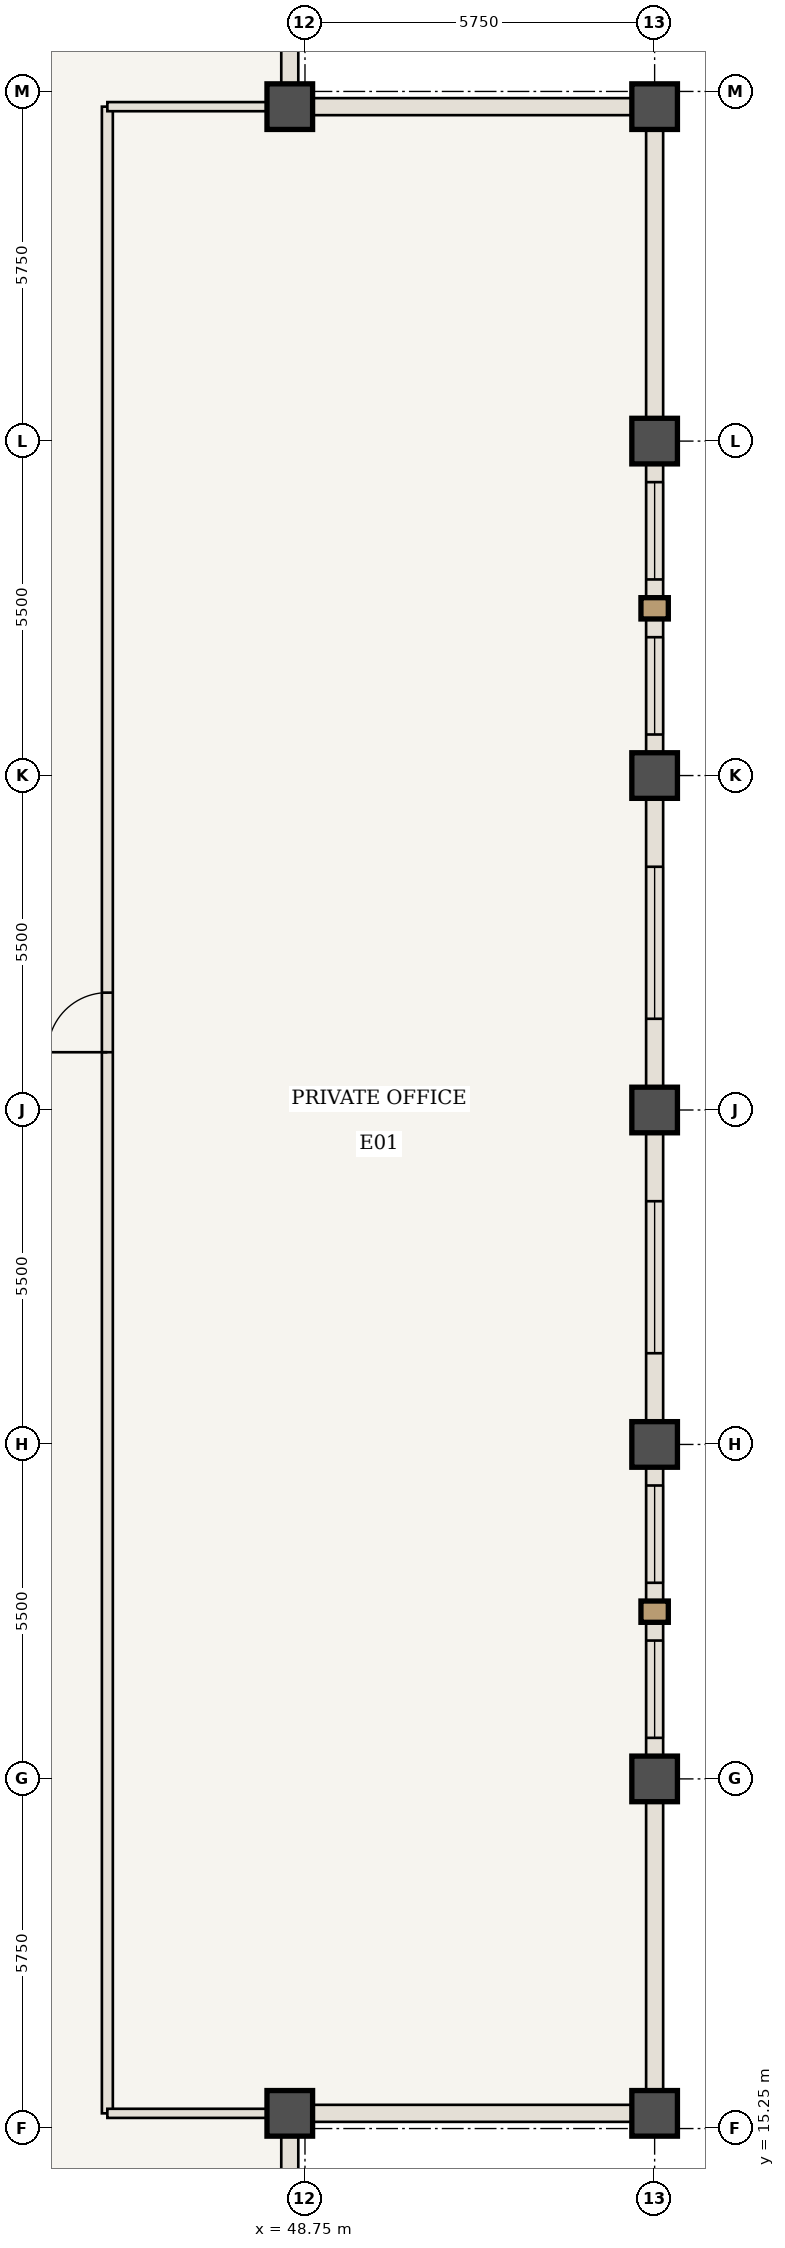
"""IFC4 building model, lengths in metres.
Left out: names, types, materials, properties, quantities, classifications, styles, units other than length and angle.
Written with IfcOpenShell. Run it as: python <this file> out.ifc"""

import sys

from ifc_helpers import new_model, si_unit, direction, frame, frame_2d, origin, origin_2d, place, context, subcontext, project, spatial, rectangle, extrude, element, fill, save


model = new_model("IFC4")
c1 = context("Model", 3, precision=1e-05, world=origin(), true_north=direction((0.0, 1.0)))
c2 = subcontext(c1, "Body", "Model", "MODEL_VIEW")
j1 = project(units=[si_unit("LENGTHUNIT", "METRE"), si_unit("PLANEANGLEUNIT", "RADIAN")], contexts=[c1])
p1 = place(None, origin())
s1 = spatial("IfcSite", under=j1, at=p1, CompositionType="ELEMENT")
p2 = place(p1, origin())
s2 = spatial("IfcBuilding", under=s1, at=p2, CompositionType="ELEMENT")
p3 = place(p2, frame((0.0, 0.0, 296.8)))
s3 = spatial("IfcBuildingStorey", under=s2, at=p3, CompositionType="ELEMENT", Elevation=296.8)
for number, where, z_axis, x_axis in (
    (1, (48.5, 15.5, 0.0), (0.0, 0.0, 1.0), (1.0, 0.0, 0.0)),
    (2, (54.5, 15.5, 0.0), (0.0, 0.0, 1.0), (1.0, 0.0, 0.0)),
    (3, (54.5, 48.5, 0.0), (0.0, 0.0, 1.0), (1.0, 0.0, 0.0)),
    (4, (48.5, 48.5, 0.0), (0.0, 0.0, 1.0), (1.0, 0.0, 0.0)),
    (5, (54.5, 21.0, 0.0), (0.0, 0.0, 1.0), (1.0, 0.0, 0.0)),
    (6, (54.5, 26.5, 0.0), (0.0, 0.0, 1.0), (1.0, 0.0, 0.0)),
    (7, (54.5, 32.0, 0.0), (0.0, 0.0, 1.0), (1.0, 0.0, 0.0)),
    (8, (54.5, 37.5, 0.0), (0.0, 0.0, 1.0), (1.0, 0.0, 0.0)),
    (9, (54.5, 43.0, 0.0), (0.0, 0.0, 1.0), (1.0, 0.0, 0.0)),
):
    element("IfcColumn", number, at=place(p3, frame(where, z_axis=z_axis, x_axis=x_axis)), inside=s3, PredefinedType="COLUMN", context=c2, shape_type="SweptSolid", body=[
        extrude(rectangle(XDim=0.75, YDim=0.75, at=origin_2d()), origin(), (0.0, 0.0, 1.0), 3.85),
    ])
p4 = place(p3, frame((45.5, 15.5, 0.0), z_axis=(0.0, 0.0, 1.0), x_axis=(0.0, 1.0, 0.0)))
e10 = element("IfcWall", 10, at=p4, inside=s3, PredefinedType="STANDARD", context=c2, shape_type="SweptSolid", body=[
    extrude(rectangle(XDim=33.0, YDim=0.18, at=frame_2d((16.5, 0.0))), origin(), (0.0, 0.0, 1.0), 3.685),
])
p5 = place(p4, frame((17.45, 0.0, 0.0)))
e11 = element("IfcOpeningElement", 11, at=p5, cuts=e10, PredefinedType="OPENING", context=c2, shape_type="SweptSolid", body=[
    extrude(rectangle(XDim=0.98, YDim=2.2, at=frame_2d((0.49, 1.1))), frame((0.0, 0.1, 0.0), z_axis=(0.0, -1.0, 0.0), x_axis=(1.0, 0.0, 0.0)), (0.0, 0.0, 1.0), 0.2),
])
for number, where, z_axis, x_axis in (
    (12, (45.5, 15.5, 0.0), (0.0, 0.0, 1.0), (1.0, 0.0, 0.0)),
    (13, (45.5, 48.5, 0.0), (0.0, 0.0, 1.0), (1.0, 0.0, 0.0)),
):
    element("IfcWall", number, at=place(p3, frame(where, z_axis=z_axis, x_axis=x_axis)), inside=s3, PredefinedType="STANDARD", context=c2, shape_type="SweptSolid", body=[
        extrude(rectangle(XDim=3.0, YDim=0.15, at=frame_2d((1.5, 0.0))), origin(), (0.0, 0.0, 1.0), 3.685),
    ])
p6 = place(p3, frame((54.5, 21.0, 0.0), z_axis=(0.0, 0.0, 1.0), x_axis=(0.0, -1.0, 0.0)))
e14 = element("IfcWall", 14, at=p6, inside=s3, PredefinedType="USERDEFINED", context=c2, shape_type="SweptSolid", body=[
    extrude(rectangle(XDim=5.5, YDim=0.28, at=frame_2d((2.75, 0.0))), origin(), (0.0, 0.0, 1.0), 2.985),
])
p7 = place(p3, frame((54.5, 26.5, 0.0), z_axis=(0.0, 0.0, 1.0), x_axis=(0.0, -1.0, 0.0)))
e15 = element("IfcWall", 15, at=p7, inside=s3, PredefinedType="USERDEFINED", context=c2, shape_type="SweptSolid", body=[
    extrude(rectangle(XDim=5.5, YDim=0.28, at=frame_2d((2.75, 0.0))), origin(), (0.0, 0.0, 1.0), 2.985),
])
p8 = place(p7, frame((0.675, 0.0, 0.85)))
e16 = element("IfcOpeningElement", 16, at=p8, cuts=e15, PredefinedType="OPENING", context=c2, shape_type="SweptSolid", body=[
    extrude(rectangle(XDim=1.6, YDim=1.935, at=frame_2d((0.8, 0.968))), frame((0.0, 0.15, 0.0), z_axis=(0.0, -1.0, 0.0), x_axis=(1.0, 0.0, 0.0)), (0.0, 0.0, 1.0), 0.3),
])
p9 = place(p7, frame((3.225, 0.0, 0.85)))
e17 = element("IfcOpeningElement", 17, at=p9, cuts=e15, PredefinedType="OPENING", context=c2, shape_type="SweptSolid", body=[
    extrude(rectangle(XDim=1.6, YDim=1.935, at=frame_2d((0.8, 0.968))), frame((0.0, 0.15, 0.0), z_axis=(0.0, -1.0, 0.0), x_axis=(1.0, 0.0, 0.0)), (0.0, 0.0, 1.0), 0.3),
])
p10 = place(p3, frame((54.5, 32.0, 0.0), z_axis=(0.0, 0.0, 1.0), x_axis=(0.0, -1.0, 0.0)))
e18 = element("IfcWall", 18, at=p10, inside=s3, PredefinedType="USERDEFINED", context=c2, shape_type="SweptSolid", body=[
    extrude(rectangle(XDim=5.5, YDim=0.28, at=frame_2d((2.75, 0.0))), origin(), (0.0, 0.0, 1.0), 2.985),
])
p11 = place(p10, frame((1.5, 0.0, 0.85)))
e19 = element("IfcOpeningElement", 19, at=p11, cuts=e18, PredefinedType="OPENING", context=c2, shape_type="SweptSolid", body=[
    extrude(rectangle(XDim=2.5, YDim=1.935, at=frame_2d((1.25, 0.968))), frame((0.0, 0.15, 0.0), z_axis=(0.0, -1.0, 0.0), x_axis=(1.0, 0.0, 0.0)), (0.0, 0.0, 1.0), 0.3),
])
p12 = place(p3, frame((54.5, 37.5, 0.0), z_axis=(0.0, 0.0, 1.0), x_axis=(0.0, -1.0, 0.0)))
e20 = element("IfcWall", 20, at=p12, inside=s3, PredefinedType="USERDEFINED", context=c2, shape_type="SweptSolid", body=[
    extrude(rectangle(XDim=5.5, YDim=0.28, at=frame_2d((2.75, 0.0))), origin(), (0.0, 0.0, 1.0), 2.985),
])
p13 = place(p12, frame((1.5, 0.0, 0.85)))
e21 = element("IfcOpeningElement", 21, at=p13, cuts=e20, PredefinedType="OPENING", context=c2, shape_type="SweptSolid", body=[
    extrude(rectangle(XDim=2.5, YDim=1.935, at=frame_2d((1.25, 0.968))), frame((0.0, 0.15, 0.0), z_axis=(0.0, -1.0, 0.0), x_axis=(1.0, 0.0, 0.0)), (0.0, 0.0, 1.0), 0.3),
])
p14 = place(p3, frame((54.5, 43.0, 0.0), z_axis=(0.0, 0.0, 1.0), x_axis=(0.0, -1.0, 0.0)))
e22 = element("IfcWall", 22, at=p14, inside=s3, PredefinedType="USERDEFINED", context=c2, shape_type="SweptSolid", body=[
    extrude(rectangle(XDim=5.5, YDim=0.28, at=frame_2d((2.75, 0.0))), origin(), (0.0, 0.0, 1.0), 2.985),
])
p15 = place(p14, frame((0.675, 0.0, 0.85)))
e23 = element("IfcOpeningElement", 23, at=p15, cuts=e22, PredefinedType="OPENING", context=c2, shape_type="SweptSolid", body=[
    extrude(rectangle(XDim=1.6, YDim=1.935, at=frame_2d((0.8, 0.968))), frame((0.0, 0.15, 0.0), z_axis=(0.0, -1.0, 0.0), x_axis=(1.0, 0.0, 0.0)), (0.0, 0.0, 1.0), 0.3),
])
p16 = place(p14, frame((3.225, 0.0, 0.85)))
e24 = element("IfcOpeningElement", 24, at=p16, cuts=e22, PredefinedType="OPENING", context=c2, shape_type="SweptSolid", body=[
    extrude(rectangle(XDim=1.6, YDim=1.935, at=frame_2d((0.8, 0.968))), frame((0.0, 0.15, 0.0), z_axis=(0.0, -1.0, 0.0), x_axis=(1.0, 0.0, 0.0)), (0.0, 0.0, 1.0), 0.3),
])
p17 = place(p3, frame((54.5, 48.5, 0.0), z_axis=(0.0, 0.0, 1.0), x_axis=(0.0, -1.0, 0.0)))
e25 = element("IfcWall", 25, at=p17, inside=s3, PredefinedType="USERDEFINED", context=c2, shape_type="SweptSolid", body=[
    extrude(rectangle(XDim=5.5, YDim=0.28, at=frame_2d((2.75, 0.0))), origin(), (0.0, 0.0, 1.0), 2.985),
])
for number, where, z_axis, x_axis in (
    (26, (48.5, 15.5, 0.0), (0.0, 0.0, 1.0), (0.0, -1.0, 0.0)),
    (27, (54.5, 15.5, 0.0), (0.0, 0.0, 1.0), (-1.0, 0.0, 0.0)),
    (28, (48.5, 48.5, 0.0), (0.0, 0.0, 1.0), (1.0, 0.0, 0.0)),
    (29, (48.5, 54.5, 0.0), (0.0, 0.0, 1.0), (0.0, -1.0, 0.0)),
):
    element("IfcWall", number, at=place(p3, frame(where, z_axis=z_axis, x_axis=x_axis)), inside=s3, PredefinedType="USERDEFINED", context=c2, shape_type="SweptSolid", body=[
        extrude(rectangle(XDim=6.0, YDim=0.28, at=frame_2d((3.0, 0.0))), origin(), (0.0, 0.0, 1.0), 2.985),
    ])
p18 = place(p5, origin())
e30 = element("IfcDoor", 30, at=p18, inside=s3, OperationType="SINGLE_SWING_LEFT", PredefinedType="DOOR", context=c2, shape_type="SweptSolid", body=[
    extrude(rectangle(XDim=0.98, YDim=2.2, at=frame_2d((0.49, 1.1))), frame((0.0, 0.025, 0.0), z_axis=(0.0, -1.0, 0.0), x_axis=(1.0, 0.0, 0.0)), (0.0, 0.0, 1.0), 0.05),
])
fill(e11, e30)
p19 = place(p8, origin())
e31 = element("IfcWindow", 31, at=p19, inside=s3, PartitioningType="SINGLE_PANEL", PredefinedType="WINDOW", context=c2, shape_type="SweptSolid", body=[
    extrude(rectangle(XDim=1.6, YDim=1.935, at=frame_2d((0.8, 0.968))), frame((0.0, 0.03, 0.0), z_axis=(0.0, -1.0, 0.0), x_axis=(1.0, 0.0, 0.0)), (0.0, 0.0, 1.0), 0.06),
])
fill(e16, e31)
p20 = place(p9, origin())
e32 = element("IfcWindow", 32, at=p20, inside=s3, PartitioningType="SINGLE_PANEL", PredefinedType="WINDOW", context=c2, shape_type="SweptSolid", body=[
    extrude(rectangle(XDim=1.6, YDim=1.935, at=frame_2d((0.8, 0.968))), frame((0.0, 0.03, 0.0), z_axis=(0.0, -1.0, 0.0), x_axis=(1.0, 0.0, 0.0)), (0.0, 0.0, 1.0), 0.06),
])
fill(e17, e32)
p21 = place(p11, origin())
e33 = element("IfcWindow", 33, at=p21, inside=s3, PartitioningType="SINGLE_PANEL", PredefinedType="WINDOW", context=c2, shape_type="SweptSolid", body=[
    extrude(rectangle(XDim=2.5, YDim=1.935, at=frame_2d((1.25, 0.968))), frame((0.0, 0.03, 0.0), z_axis=(0.0, -1.0, 0.0), x_axis=(1.0, 0.0, 0.0)), (0.0, 0.0, 1.0), 0.06),
])
fill(e19, e33)
p22 = place(p13, origin())
e34 = element("IfcWindow", 34, at=p22, inside=s3, PartitioningType="SINGLE_PANEL", PredefinedType="WINDOW", context=c2, shape_type="SweptSolid", body=[
    extrude(rectangle(XDim=2.5, YDim=1.935, at=frame_2d((1.25, 0.968))), frame((0.0, 0.03, 0.0), z_axis=(0.0, -1.0, 0.0), x_axis=(1.0, 0.0, 0.0)), (0.0, 0.0, 1.0), 0.06),
])
fill(e21, e34)
p23 = place(p15, origin())
e35 = element("IfcWindow", 35, at=p23, inside=s3, PartitioningType="SINGLE_PANEL", PredefinedType="WINDOW", context=c2, shape_type="SweptSolid", body=[
    extrude(rectangle(XDim=1.6, YDim=1.935, at=frame_2d((0.8, 0.968))), frame((0.0, 0.03, 0.0), z_axis=(0.0, -1.0, 0.0), x_axis=(1.0, 0.0, 0.0)), (0.0, 0.0, 1.0), 0.06),
])
fill(e23, e35)
p24 = place(p16, origin())
e36 = element("IfcWindow", 36, at=p24, inside=s3, PartitioningType="SINGLE_PANEL", PredefinedType="WINDOW", context=c2, shape_type="SweptSolid", body=[
    extrude(rectangle(XDim=1.6, YDim=1.935, at=frame_2d((0.8, 0.968))), frame((0.0, 0.03, 0.0), z_axis=(0.0, -1.0, 0.0), x_axis=(1.0, 0.0, 0.0)), (0.0, 0.0, 1.0), 0.06),
])
fill(e24, e36)
save(model, sys.argv[1])
